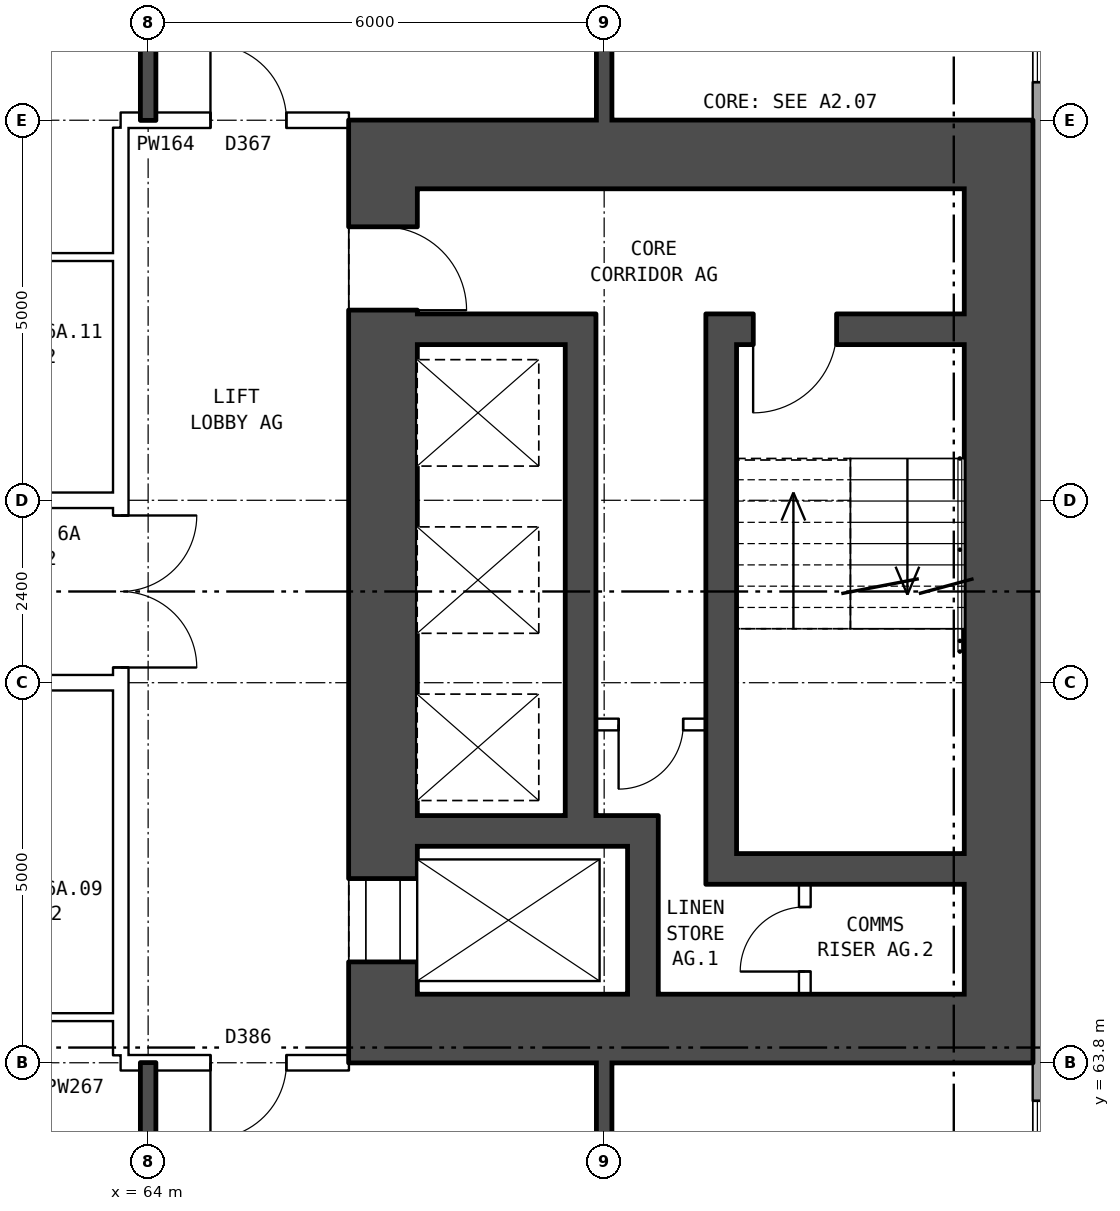
"""IFC4 building model, lengths in metres.
Left out: names, types, materials, properties, quantities, classifications, styles, units other than length and angle.
Written with IfcOpenShell. Run it as: python <this file> out.ifc"""

import sys

from ifc_helpers import new_model, si_unit, direction, frame, frame_2d, origin, place, context, subcontext, project, spatial, rectangle, extrude, element, fill, save


model = new_model("IFC4")
c1 = context("Model", 3, precision=1e-05, world=origin(), true_north=direction((0.0, 1.0)))
c2 = subcontext(c1, "Body", "Model", "MODEL_VIEW")
j1 = project(units=[si_unit("LENGTHUNIT", "METRE"), si_unit("PLANEANGLEUNIT", "RADIAN")], contexts=[c1])
p1 = place(None, origin())
s1 = spatial("IfcSite", under=j1, at=p1, CompositionType="ELEMENT")
p2 = place(p1, origin())
s2 = spatial("IfcBuilding", under=s1, at=p2, CompositionType="ELEMENT")
p3 = place(p2, frame((0.0, 0.0, 25.7)))
s3 = spatial("IfcBuildingStorey", under=s2, at=p3, CompositionType="ELEMENT", Elevation=25.7)
p4 = place(p3, frame((75.82, 57.075, 0.0), z_axis=(0.0, 0.0, 1.0), x_axis=(0.0, 1.0, 0.0)))
e1 = element("IfcWall", 1, at=p4, inside=s3, PredefinedType="STANDARD", context=c2, shape_type="SweptSolid", body=[
    extrude(rectangle(XDim=25.851, YDim=0.36, at=frame_2d((12.925, 0.0))), origin(), (0.0, 0.0, 1.0), 2.85),
])
p5 = place(p4, frame((1.625, 0.0, 0.8)))
e2 = element("IfcOpeningElement", 2, at=p5, cuts=e1, PredefinedType="OPENING", context=c2, shape_type="SweptSolid", body=[
    extrude(rectangle(XDim=1.6, YDim=1.8, at=frame_2d((0.8, 0.9))), frame((0.0, 0.19, 0.0), z_axis=(0.0, -1.0, 0.0), x_axis=(1.0, 0.0, 0.0)), (0.0, 0.0, 1.0), 0.38),
])
p6 = place(p4, frame((4.625, 0.0, 0.8)))
e3 = element("IfcOpeningElement", 3, at=p6, cuts=e1, PredefinedType="OPENING", context=c2, shape_type="SweptSolid", body=[
    extrude(rectangle(XDim=1.6, YDim=1.8, at=frame_2d((0.8, 0.9))), frame((0.0, 0.19, 0.0), z_axis=(0.0, -1.0, 0.0), x_axis=(1.0, 0.0, 0.0)), (0.0, 0.0, 1.0), 0.38),
])
p7 = place(p4, frame((19.625, 0.0, 0.8)))
e4 = element("IfcOpeningElement", 4, at=p7, cuts=e1, PredefinedType="OPENING", context=c2, shape_type="SweptSolid", body=[
    extrude(rectangle(XDim=1.6, YDim=1.8, at=frame_2d((0.8, 0.9))), frame((0.0, 0.19, 0.0), z_axis=(0.0, -1.0, 0.0), x_axis=(1.0, 0.0, 0.0)), (0.0, 0.0, 1.0), 0.38),
])
p8 = place(p4, frame((22.625, 0.0, 0.8)))
e5 = element("IfcOpeningElement", 5, at=p8, cuts=e1, PredefinedType="OPENING", context=c2, shape_type="SweptSolid", body=[
    extrude(rectangle(XDim=1.6, YDim=1.8, at=frame_2d((0.8, 0.9))), frame((0.0, 0.19, 0.0), z_axis=(0.0, -1.0, 0.0), x_axis=(1.0, 0.0, 0.0)), (0.0, 0.0, 1.0), 0.38),
])
p9 = place(p3, frame((67.09, 64.7, 0.0), z_axis=(0.0, 0.0, 1.0), x_axis=(0.0, 1.0, 0.0)))
e6 = element("IfcWall", 6, at=p9, inside=s3, PredefinedType="SHEAR", context=c2, shape_type="SweptSolid", body=[
    extrude(rectangle(XDim=10.6, YDim=0.9, at=frame_2d((5.3, 0.0))), origin(), (0.0, 0.0, 1.0), 2.85),
])
p10 = place(p9, frame((0.425, 0.0, 0.0)))
e7 = element("IfcOpeningElement", 7, at=p10, cuts=e6, PredefinedType="OPENING", context=c2, shape_type="SweptSolid", body=[
    extrude(rectangle(XDim=1.1, YDim=2.1, at=frame_2d((0.55, 1.05))), frame((0.0, 0.46, 0.0), z_axis=(0.0, -1.0, 0.0), x_axis=(1.0, 0.0, 0.0)), (0.0, 0.0, 1.0), 0.92),
])
p11 = place(p9, frame((9.0, 0.0, 0.0)))
e8 = element("IfcOpeningElement", 8, at=p11, cuts=e6, PredefinedType="OPENING", context=c2, shape_type="SweptSolid", body=[
    extrude(rectangle(XDim=1.1, YDim=2.1, at=frame_2d((0.55, 1.05))), frame((0.0, 0.46, 0.0), z_axis=(0.0, -1.0, 0.0), x_axis=(1.0, 0.0, 0.0)), (0.0, 0.0, 1.0), 0.92),
])
p12 = place(p3, frame((75.19, 64.7, 0.0), z_axis=(0.0, 0.0, 1.0), x_axis=(0.0, 1.0, 0.0)))
e9 = element("IfcWall", 9, at=p12, inside=s3, PredefinedType="SHEAR", context=c2, shape_type="SweptSolid", body=[
    extrude(rectangle(XDim=10.6, YDim=0.9, at=frame_2d((5.3, 0.0))), origin(), (0.0, 0.0, 1.0), 2.85),
])
for number, where, z_axis, x_axis in (
    (10, (66.64, 64.25, 0.0), (0.0, 0.0, 1.0), (1.0, 0.0, 0.0)),
    (11, (66.64, 75.75, 0.0), (0.0, 0.0, 1.0), (1.0, 0.0, 0.0)),
):
    element("IfcWall", number, at=place(p3, frame(where, z_axis=z_axis, x_axis=x_axis)), inside=s3, PredefinedType="SHEAR", context=c2, shape_type="SweptSolid", body=[
        extrude(rectangle(XDim=9.0, YDim=0.9, at=frame_2d((4.5, 0.0))), origin(), (0.0, 0.0, 1.0), 2.85),
    ])
p13 = place(p3, frame((71.74, 66.35, 0.0), z_axis=(0.0, 0.0, 1.0), x_axis=(1.0, 0.0, 0.0)))
e12 = element("IfcWall", 12, at=p13, inside=s3, PredefinedType="SHEAR", context=c2, shape_type="SweptSolid", body=[
    extrude(rectangle(XDim=3.0, YDim=0.4, at=frame_2d((1.5, 0.0))), origin(), (0.0, 0.0, 1.0), 2.85),
])
p14 = place(p3, frame((67.54, 66.85, 0.0), z_axis=(0.0, 0.0, 1.0), x_axis=(1.0, 0.0, 0.0)))
e13 = element("IfcWall", 13, at=p14, inside=s3, PredefinedType="SHEAR", context=c2, shape_type="SweptSolid", body=[
    extrude(rectangle(XDim=3.17, YDim=0.4, at=frame_2d((1.585, 0.0))), origin(), (0.0, 0.0, 1.0), 2.85),
])
p15 = place(p3, frame((69.89, 68.25, 0.0), z_axis=(0.0, 0.0, 1.0), x_axis=(1.0, 0.0, 0.0)))
e14 = element("IfcWall", 14, at=p15, inside=s3, PredefinedType="PARTITIONING", context=c2, shape_type="SweptSolid", body=[
    extrude(rectangle(XDim=1.45, YDim=0.15, at=frame_2d((0.725, 0.0))), origin(), (0.0, 0.0, 1.0), 2.85),
])
p16 = place(p15, frame((0.3, 0.0, 0.0)))
e15 = element("IfcOpeningElement", 15, at=p16, cuts=e14, PredefinedType="OPENING", context=c2, shape_type="SweptSolid", body=[
    extrude(rectangle(XDim=0.85, YDim=2.1, at=frame_2d((0.425, 1.05))), frame((0.0, 0.085, 0.0), z_axis=(0.0, -1.0, 0.0), x_axis=(1.0, 0.0, 0.0)), (0.0, 0.0, 1.0), 0.17),
])
p17 = place(p3, frame((67.54, 73.45, 0.0), z_axis=(0.0, 0.0, 1.0), x_axis=(1.0, 0.0, 0.0)))
e16 = element("IfcWall", 16, at=p17, inside=s3, PredefinedType="SHEAR", context=c2, shape_type="SweptSolid", body=[
    extrude(rectangle(XDim=1.95, YDim=0.4, at=frame_2d((0.975, 0.0))), origin(), (0.0, 0.0, 1.0), 2.85),
])
p18 = place(p3, frame((71.74, 73.45, 0.0), z_axis=(0.0, 0.0, 1.0), x_axis=(1.0, 0.0, 0.0)))
e17 = element("IfcWall", 17, at=p18, inside=s3, PredefinedType="SHEAR", context=c2, shape_type="SweptSolid", body=[
    extrude(rectangle(XDim=3.0, YDim=0.4, at=frame_2d((1.5, 0.0))), origin(), (0.0, 0.0, 1.0), 2.85),
])
p19 = place(p18, frame((0.22, 0.0, 0.0)))
e18 = element("IfcOpeningElement", 18, at=p19, cuts=e17, PredefinedType="OPENING", context=c2, shape_type="SweptSolid", body=[
    extrude(rectangle(XDim=1.1, YDim=2.1, at=frame_2d((0.55, 1.05))), frame((0.0, 0.21, 0.0), z_axis=(0.0, -1.0, 0.0), x_axis=(1.0, 0.0, 0.0)), (0.0, 0.0, 1.0), 0.42),
])
p20 = place(p3, frame((69.69, 67.05, 0.0), z_axis=(0.0, 0.0, 1.0), x_axis=(0.0, 1.0, 0.0)))
e19 = element("IfcWall", 19, at=p20, inside=s3, PredefinedType="SHEAR", context=c2, shape_type="SweptSolid", body=[
    extrude(rectangle(XDim=6.6, YDim=0.4, at=frame_2d((3.3, 0.0))), origin(), (0.0, 0.0, 1.0), 2.85),
])
p21 = place(p3, frame((70.51, 64.7, 0.0), z_axis=(0.0, 0.0, 1.0), x_axis=(0.0, 1.0, 0.0)))
e20 = element("IfcWall", 20, at=p21, inside=s3, PredefinedType="SHEAR", context=c2, shape_type="SweptSolid", body=[
    extrude(rectangle(XDim=1.95, YDim=0.4, at=frame_2d((0.975, 0.0))), origin(), (0.0, 0.0, 1.0), 2.85),
])
p22 = place(p3, frame((71.54, 66.15, 0.0), z_axis=(0.0, 0.0, 1.0), x_axis=(0.0, 1.0, 0.0)))
e21 = element("IfcWall", 21, at=p22, inside=s3, PredefinedType="SHEAR", context=c2, shape_type="SweptSolid", body=[
    extrude(rectangle(XDim=7.5, YDim=0.4, at=frame_2d((3.75, 0.0))), origin(), (0.0, 0.0, 1.0), 2.85),
])
p23 = place(p3, frame((72.64, 64.7, 0.0), z_axis=(0.0, 0.0, 1.0), x_axis=(0.0, 1.0, 0.0)))
e22 = element("IfcWall", 22, at=p23, inside=s3, PredefinedType="PARTITIONING", context=c2, shape_type="SweptSolid", body=[
    extrude(rectangle(XDim=1.45, YDim=0.15, at=frame_2d((0.725, 0.0))), origin(), (0.0, 0.0, 1.0), 2.85),
])
p24 = place(p23, frame((0.3, 0.0, 0.0)))
e23 = element("IfcOpeningElement", 23, at=p24, cuts=e22, PredefinedType="OPENING", context=c2, shape_type="SweptSolid", body=[
    extrude(rectangle(XDim=0.85, YDim=2.1, at=frame_2d((0.425, 1.05))), frame((0.0, 0.085, 0.0), z_axis=(0.0, -1.0, 0.0), x_axis=(1.0, 0.0, 0.0)), (0.0, 0.0, 1.0), 0.17),
])
p25 = place(p3, frame((63.64, 63.9, 0.0), z_axis=(0.0, 0.0, 1.0), x_axis=(0.0, 1.0, 0.0)))
e24 = element("IfcWall", 24, at=p25, inside=s3, PredefinedType="PARTITIONING", context=c2, shape_type="SweptSolid", body=[
    extrude(rectangle(XDim=12.2, YDim=0.2, at=frame_2d((6.1, 0.0))), origin(), (0.0, 0.0, 1.0), 2.85),
])
p26 = place(p25, frame((5.1, 0.0, 0.0)))
e25 = element("IfcOpeningElement", 25, at=p26, cuts=e24, PredefinedType="OPENING", context=c2, shape_type="SweptSolid", body=[
    extrude(rectangle(XDim=2.0, YDim=2.1, at=frame_2d((1.0, 1.05))), frame((0.0, 0.11, 0.0), z_axis=(0.0, -1.0, 0.0), x_axis=(1.0, 0.0, 0.0)), (0.0, 0.0, 1.0), 0.22),
])
p27 = place(p3, frame((63.64, 63.8, 0.0), z_axis=(0.0, 0.0, 1.0), x_axis=(1.0, 0.0, 0.0)))
e26 = element("IfcWall", 26, at=p27, inside=s3, PredefinedType="PARTITIONING", context=c2, shape_type="SweptSolid", body=[
    extrude(rectangle(XDim=3.0, YDim=0.2, at=frame_2d((1.5, 0.0))), origin(), (0.0, 0.0, 1.0), 2.85),
])
p28 = place(p27, frame((1.18, 0.0, 0.0)))
e27 = element("IfcOpeningElement", 27, at=p28, cuts=e26, PredefinedType="OPENING", context=c2, shape_type="SweptSolid", body=[
    extrude(rectangle(XDim=1.0, YDim=2.1, at=frame_2d((0.5, 1.05))), frame((0.0, 0.11, 0.0), z_axis=(0.0, -1.0, 0.0), x_axis=(1.0, 0.0, 0.0)), (0.0, 0.0, 1.0), 0.22),
])
p29 = place(p3, frame((61.0, 64.4, 0.0), z_axis=(0.0, 0.0, 1.0), x_axis=(1.0, 0.0, 0.0)))
e28 = element("IfcWall", 28, at=p29, inside=s3, PredefinedType="PARTITIONING", context=c2, shape_type="SweptSolid", body=[
    extrude(rectangle(XDim=2.64, YDim=0.1, at=frame_2d((1.32, 0.0))), origin(), (0.0, 0.0, 1.0), 2.85),
])
p30 = place(p3, frame((44.36, 68.8, 0.0), z_axis=(0.0, 0.0, 1.0), x_axis=(1.0, 0.0, 0.0)))
e29 = element("IfcWall", 29, at=p30, inside=s3, PredefinedType="PARTITIONING", context=c2, shape_type="SweptSolid", body=[
    extrude(rectangle(XDim=19.28, YDim=0.2, at=frame_2d((9.64, 0.0))), origin(), (0.0, 0.0, 1.0), 2.85),
])
p31 = place(p30, frame((14.64, 0.0, 0.0)))
e30 = element("IfcOpeningElement", 30, at=p31, cuts=e29, PredefinedType="OPENING", context=c2, shape_type="SweptSolid", body=[
    extrude(rectangle(XDim=1.0, YDim=2.1, at=frame_2d((0.5, 1.05))), frame((0.0, 0.11, 0.0), z_axis=(0.0, -1.0, 0.0), x_axis=(1.0, 0.0, 0.0)), (0.0, 0.0, 1.0), 0.22),
])
p32 = place(p30, frame((5.64, 0.0, 0.0)))
e31 = element("IfcOpeningElement", 31, at=p32, cuts=e29, PredefinedType="OPENING", context=c2, shape_type="SweptSolid", body=[
    extrude(rectangle(XDim=1.0, YDim=2.1, at=frame_2d((0.5, 1.05))), frame((0.0, 0.11, 0.0), z_axis=(0.0, -1.0, 0.0), x_axis=(1.0, 0.0, 0.0)), (0.0, 0.0, 1.0), 0.22),
])
p33 = place(p3, frame((44.36, 71.2, 0.0), z_axis=(0.0, 0.0, 1.0), x_axis=(1.0, 0.0, 0.0)))
e32 = element("IfcWall", 32, at=p33, inside=s3, PredefinedType="PARTITIONING", context=c2, shape_type="SweptSolid", body=[
    extrude(rectangle(XDim=19.28, YDim=0.2, at=frame_2d((9.64, 0.0))), origin(), (0.0, 0.0, 1.0), 2.85),
])
p34 = place(p33, frame((14.64, 0.0, 0.0)))
e33 = element("IfcOpeningElement", 33, at=p34, cuts=e32, PredefinedType="OPENING", context=c2, shape_type="SweptSolid", body=[
    extrude(rectangle(XDim=1.0, YDim=2.1, at=frame_2d((0.5, 1.05))), frame((0.0, 0.11, 0.0), z_axis=(0.0, -1.0, 0.0), x_axis=(1.0, 0.0, 0.0)), (0.0, 0.0, 1.0), 0.22),
])
p35 = place(p33, frame((5.64, 0.0, 0.0)))
e34 = element("IfcOpeningElement", 34, at=p35, cuts=e32, PredefinedType="OPENING", context=c2, shape_type="SweptSolid", body=[
    extrude(rectangle(XDim=1.0, YDim=2.1, at=frame_2d((0.5, 1.05))), frame((0.0, 0.11, 0.0), z_axis=(0.0, -1.0, 0.0), x_axis=(1.0, 0.0, 0.0)), (0.0, 0.0, 1.0), 0.22),
])
p36 = place(p3, frame((61.0, 74.4, 0.0), z_axis=(0.0, 0.0, 1.0), x_axis=(1.0, 0.0, 0.0)))
e35 = element("IfcWall", 35, at=p36, inside=s3, PredefinedType="PARTITIONING", context=c2, shape_type="SweptSolid", body=[
    extrude(rectangle(XDim=2.64, YDim=0.1, at=frame_2d((1.32, 0.0))), origin(), (0.0, 0.0, 1.0), 2.85),
])
p37 = place(p3, frame((63.64, 76.2, 0.0), z_axis=(0.0, 0.0, 1.0), x_axis=(1.0, 0.0, 0.0)))
e36 = element("IfcWall", 36, at=p37, inside=s3, PredefinedType="PARTITIONING", context=c2, shape_type="SweptSolid", body=[
    extrude(rectangle(XDim=3.0, YDim=0.2, at=frame_2d((1.5, 0.0))), origin(), (0.0, 0.0, 1.0), 2.85),
])
p38 = place(p37, frame((1.18, 0.0, 0.0)))
e37 = element("IfcOpeningElement", 37, at=p38, cuts=e36, PredefinedType="OPENING", context=c2, shape_type="SweptSolid", body=[
    extrude(rectangle(XDim=1.0, YDim=2.1, at=frame_2d((0.5, 1.05))), frame((0.0, 0.11, 0.0), z_axis=(0.0, -1.0, 0.0), x_axis=(1.0, 0.0, 0.0)), (0.0, 0.0, 1.0), 0.22),
])
for number, where, z_axis, x_axis in (
    (38, (64.0, 54.36, 0.0), (0.0, 0.0, 1.0), (0.0, 1.0, 0.0)),
    (39, (64.0, 76.2, 0.0), (0.0, 0.0, 1.0), (0.0, 1.0, 0.0)),
):
    element("IfcWall", number, at=place(p3, frame(where, z_axis=z_axis, x_axis=x_axis)), inside=s3, PredefinedType="SOLIDWALL", context=c2, shape_type="SweptSolid", body=[
        extrude(rectangle(XDim=9.44, YDim=0.2, at=frame_2d((4.72, 0.0))), origin(), (0.0, 0.0, 1.0), 2.85),
    ])
p39 = place(p3, frame((70.0, 54.36, 0.0), z_axis=(0.0, 0.0, 1.0), x_axis=(0.0, 1.0, 0.0)))
e40 = element("IfcWall", 40, at=p39, inside=s3, PredefinedType="SOLIDWALL", context=c2, shape_type="SweptSolid", body=[
    extrude(rectangle(XDim=9.44, YDim=0.2, at=frame_2d((4.72, 0.0))), origin(), (0.0, 0.0, 1.0), 2.85),
])
p40 = place(p39, frame((7.04, 0.0, 0.0)))
e41 = element("IfcOpeningElement", 41, at=p40, cuts=e40, PredefinedType="OPENING", context=c2, shape_type="SweptSolid", body=[
    extrude(rectangle(XDim=0.9, YDim=2.1, at=frame_2d((0.45, 1.05))), frame((0.0, 0.11, 0.0), z_axis=(0.0, -1.0, 0.0), x_axis=(1.0, 0.0, 0.0)), (0.0, 0.0, 1.0), 0.22),
])
p41 = place(p3, frame((70.0, 76.2, 0.0), z_axis=(0.0, 0.0, 1.0), x_axis=(0.0, 1.0, 0.0)))
e42 = element("IfcWall", 42, at=p41, inside=s3, PredefinedType="SOLIDWALL", context=c2, shape_type="SweptSolid", body=[
    extrude(rectangle(XDim=9.44, YDim=0.2, at=frame_2d((4.72, 0.0))), origin(), (0.0, 0.0, 1.0), 2.85),
])
p42 = place(p41, frame((1.5, 0.0, 0.0)))
e43 = element("IfcOpeningElement", 43, at=p42, cuts=e42, PredefinedType="OPENING", context=c2, shape_type="SweptSolid", body=[
    extrude(rectangle(XDim=0.9, YDim=2.1, at=frame_2d((0.45, 1.05))), frame((0.0, 0.11, 0.0), z_axis=(0.0, -1.0, 0.0), x_axis=(1.0, 0.0, 0.0)), (0.0, 0.0, 1.0), 0.22),
])
p43 = place(p6, origin())
e44 = element("IfcWindow", 44, at=p43, inside=s3, PartitioningType="SINGLE_PANEL", PredefinedType="WINDOW", context=c2, shape_type="SweptSolid", body=[
    extrude(rectangle(XDim=1.6, YDim=1.8, at=frame_2d((0.8, 0.9))), frame((0.0, 0.15, 0.0), z_axis=(0.0, -1.0, 0.0), x_axis=(1.0, 0.0, 0.0)), (0.0, 0.0, 1.0), 0.06),
])
fill(e3, e44)
p44 = place(p7, origin())
e45 = element("IfcWindow", 45, at=p44, inside=s3, PartitioningType="SINGLE_PANEL", PredefinedType="WINDOW", context=c2, shape_type="SweptSolid", body=[
    extrude(rectangle(XDim=1.6, YDim=1.8, at=frame_2d((0.8, 0.9))), frame((0.0, 0.15, 0.0), z_axis=(0.0, -1.0, 0.0), x_axis=(1.0, 0.0, 0.0)), (0.0, 0.0, 1.0), 0.06),
])
fill(e4, e45)
p45 = place(p10, origin())
e46 = element("IfcDoor", 46, at=p45, inside=s3, OperationType="DOUBLE_DOOR_SLIDING", PredefinedType="DOOR", context=c2, shape_type="SweptSolid", body=[
    extrude(rectangle(XDim=1.1, YDim=2.1, at=frame_2d((0.55, 1.05))), frame((0.0, -0.385, 0.0), z_axis=(0.0, -1.0, 0.0), x_axis=(1.0, 0.0, 0.0)), (0.0, 0.0, 1.0), 0.05),
])
fill(e7, e46)
p46 = place(p11, frame((1.1, 0.0, 0.0), z_axis=(0.0, 0.0, 1.0), x_axis=(-1.0, 0.0, 0.0)))
e47 = element("IfcDoor", 47, at=p46, inside=s3, OperationType="SINGLE_SWING_RIGHT", PredefinedType="DOOR", context=c2, shape_type="SweptSolid", body=[
    extrude(rectangle(XDim=1.1, YDim=2.1, at=frame_2d((0.55, 1.05))), frame((0.0, 0.435, 0.0), z_axis=(0.0, -1.0, 0.0), x_axis=(1.0, 0.0, 0.0)), (0.0, 0.0, 1.0), 0.05),
])
fill(e8, e47)
p47 = place(p19, frame((1.1, 0.0, 0.0), z_axis=(0.0, 0.0, 1.0), x_axis=(-1.0, 0.0, 0.0)))
e48 = element("IfcDoor", 48, at=p47, inside=s3, OperationType="SINGLE_SWING_RIGHT", PredefinedType="DOOR", context=c2, shape_type="SweptSolid", body=[
    extrude(rectangle(XDim=1.1, YDim=2.1, at=frame_2d((0.55, 1.05))), frame((0.0, 0.025, 0.0), z_axis=(0.0, -1.0, 0.0), x_axis=(1.0, 0.0, 0.0)), (0.0, 0.0, 1.0), 0.05),
])
fill(e18, e48)
p48 = place(p16, frame((0.85, 0.0, 0.0), z_axis=(0.0, 0.0, 1.0), x_axis=(-1.0, 0.0, 0.0)))
e49 = element("IfcDoor", 49, at=p48, inside=s3, OperationType="SINGLE_SWING_RIGHT", PredefinedType="DOOR", context=c2, shape_type="SweptSolid", body=[
    extrude(rectangle(XDim=0.85, YDim=2.1, at=frame_2d((0.425, 1.05))), frame((0.0, 0.025, 0.0), z_axis=(0.0, -1.0, 0.0), x_axis=(1.0, 0.0, 0.0)), (0.0, 0.0, 1.0), 0.05),
])
fill(e15, e49)
p49 = place(p24, origin())
e50 = element("IfcDoor", 50, at=p49, inside=s3, OperationType="SINGLE_SWING_LEFT", PredefinedType="DOOR", context=c2, shape_type="SweptSolid", body=[
    extrude(rectangle(XDim=0.85, YDim=2.1, at=frame_2d((0.425, 1.05))), frame((0.0, 0.025, 0.0), z_axis=(0.0, -1.0, 0.0), x_axis=(1.0, 0.0, 0.0)), (0.0, 0.0, 1.0), 0.05),
])
fill(e23, e50)
p50 = place(p26, frame((2.0, 0.0, 0.0), z_axis=(0.0, 0.0, 1.0), x_axis=(-1.0, 0.0, 0.0)))
e51 = element("IfcDoor", 51, at=p50, inside=s3, OperationType="DOUBLE_DOOR_SINGLE_SWING", PredefinedType="DOOR", context=c2, shape_type="SweptSolid", body=[
    extrude(rectangle(XDim=2.0, YDim=2.1, at=frame_2d((1.0, 1.05))), frame((0.0, 0.025, 0.0), z_axis=(0.0, -1.0, 0.0), x_axis=(1.0, 0.0, 0.0)), (0.0, 0.0, 1.0), 0.05),
])
fill(e25, e51)
p51 = place(p28, frame((1.0, 0.0, 0.0), z_axis=(0.0, 0.0, 1.0), x_axis=(-1.0, 0.0, 0.0)))
e52 = element("IfcDoor", 52, at=p51, inside=s3, OperationType="SINGLE_SWING_RIGHT", PredefinedType="DOOR", context=c2, shape_type="SweptSolid", body=[
    extrude(rectangle(XDim=1.0, YDim=2.1, at=frame_2d((0.5, 1.05))), frame((0.0, 0.025, 0.0), z_axis=(0.0, -1.0, 0.0), x_axis=(1.0, 0.0, 0.0)), (0.0, 0.0, 1.0), 0.05),
])
fill(e27, e52)
p52 = place(p38, origin())
e53 = element("IfcDoor", 53, at=p52, inside=s3, OperationType="SINGLE_SWING_LEFT", PredefinedType="DOOR", context=c2, shape_type="SweptSolid", body=[
    extrude(rectangle(XDim=1.0, YDim=2.1, at=frame_2d((0.5, 1.05))), frame((0.0, 0.025, 0.0), z_axis=(0.0, -1.0, 0.0), x_axis=(1.0, 0.0, 0.0)), (0.0, 0.0, 1.0), 0.05),
])
fill(e37, e53)
save(model, sys.argv[1])
